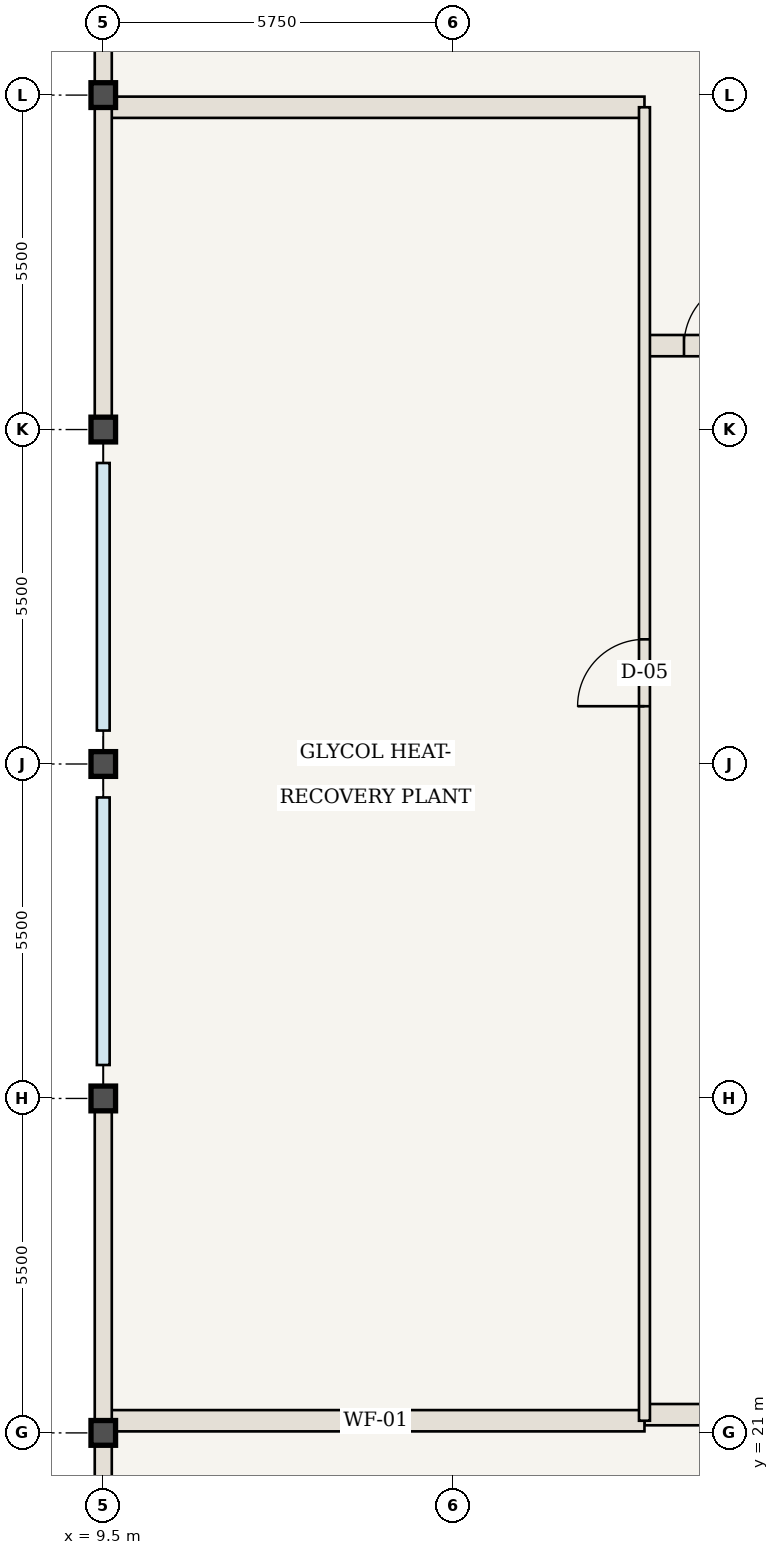
"""IFC4 building model, lengths in metres.
Left out: names, types, materials, properties, quantities, classifications, styles, units other than length and angle.
Written with IfcOpenShell. Run it as: python <this file> out.ifc"""

import sys

from ifc_helpers import new_model, si_unit, direction, frame, frame_2d, origin, origin_2d, place, context, subcontext, project, spatial, rectangle, i_section, extrude, element, fill, save


model = new_model("IFC4")
c1 = context("Model", 3, precision=1e-05, world=origin(), true_north=direction((0.0, 1.0)))
c2 = subcontext(c1, "Body", "Model", "MODEL_VIEW")
j1 = project(units=[si_unit("LENGTHUNIT", "METRE"), si_unit("PLANEANGLEUNIT", "RADIAN")], contexts=[c1])
p1 = place(None, origin())
s1 = spatial("IfcSite", under=j1, at=p1, CompositionType="ELEMENT")
p2 = place(p1, origin())
s2 = spatial("IfcBuilding", under=s1, at=p2, CompositionType="ELEMENT")
p3 = place(p2, frame((0.0, 0.0, 317.8)))
s3 = spatial("IfcBuildingStorey", under=s2, at=p3, CompositionType="ELEMENT", Elevation=317.8)
for number, where, z_axis, x_axis in (
    (1, (9.5, 21.0, 0.0), (0.0, 0.0, 1.0), (1.0, 0.0, 0.0)),
    (2, (9.5, 26.5, 0.0), (0.0, 0.0, 1.0), (1.0, 0.0, 0.0)),
    (3, (9.5, 32.0, 0.0), (0.0, 0.0, 1.0), (1.0, 0.0, 0.0)),
    (4, (9.5, 37.5, 0.0), (0.0, 0.0, 1.0), (1.0, 0.0, 0.0)),
    (5, (9.5, 43.0, 0.0), (0.0, 0.0, 1.0), (1.0, 0.0, 0.0)),
):
    element("IfcColumn", number, at=place(p3, frame(where, z_axis=z_axis, x_axis=x_axis)), inside=s3, PredefinedType="COLUMN", context=c2, shape_type="SweptSolid", body=[
        extrude(i_section(OverallWidth=0.404, OverallDepth=0.407, WebThickness=0.027, FlangeThickness=0.044, at=origin_2d()), origin(), (0.0, 0.0, 1.0), 4.55),
    ])
p4 = place(p3, frame((18.4, 21.3, 0.0), z_axis=(0.0, 0.0, 1.0), x_axis=(1.0, 0.0, 0.0)))
e6 = element("IfcWall", 6, at=p4, inside=s3, PredefinedType="STANDARD", context=c2, shape_type="SweptSolid", body=[
    extrude(rectangle(XDim=2.55, YDim=0.35, at=frame_2d((1.275, 0.0))), origin(), (0.0, 0.0, 1.0), 4.29),
])
p5 = place(p3, frame((18.4, 38.88, 0.0), z_axis=(0.0, 0.0, 1.0), x_axis=(1.0, 0.0, 0.0)))
e7 = element("IfcWall", 7, at=p5, inside=s3, PredefinedType="STANDARD", context=c2, shape_type="SweptSolid", body=[
    extrude(rectangle(XDim=2.55, YDim=0.35, at=frame_2d((1.275, 0.0))), origin(), (0.0, 0.0, 1.0), 4.29),
])
p6 = place(p5, frame((0.65, 0.0, 0.0)))
e8 = element("IfcOpeningElement", 8, at=p6, cuts=e7, PredefinedType="OPENING", context=c2, shape_type="SweptSolid", body=[
    extrude(rectangle(XDim=1.1, YDim=2.15, at=frame_2d((0.55, 1.075))), frame((0.0, 0.185, 0.0), z_axis=(0.0, -1.0, 0.0), x_axis=(1.0, 0.0, 0.0)), (0.0, 0.0, 1.0), 0.37),
])
for number, where, z_axis, x_axis in (
    (9, (9.56, 21.2, 0.0), (0.0, 0.0, 1.0), (1.0, 0.0, 0.0)),
    (10, (9.56, 42.8, 0.0), (0.0, 0.0, 1.0), (1.0, 0.0, 0.0)),
):
    element("IfcWall", number, at=place(p3, frame(where, z_axis=z_axis, x_axis=x_axis)), inside=s3, PredefinedType="STANDARD", context=c2, shape_type="SweptSolid", body=[
        extrude(rectangle(XDim=8.84, YDim=0.35, at=frame_2d((4.42, 0.0))), origin(), (0.0, 0.0, 1.0), 4.29),
    ])
p7 = place(p3, frame((18.4, 21.2, 0.0), z_axis=(0.0, 0.0, 1.0), x_axis=(0.0, 1.0, 0.0)))
e11 = element("IfcWall", 11, at=p7, inside=s3, PredefinedType="STANDARD", context=c2, shape_type="SweptSolid", body=[
    extrude(rectangle(XDim=21.6, YDim=0.18, at=frame_2d((10.8, 0.0))), origin(), (0.0, 0.0, 1.0), 4.29),
])
p8 = place(p7, frame((11.75, 0.0, 0.0)))
e12 = element("IfcOpeningElement", 12, at=p8, cuts=e11, PredefinedType="OPENING", context=c2, shape_type="SweptSolid", body=[
    extrude(rectangle(XDim=1.1, YDim=2.15, at=frame_2d((0.55, 1.075))), frame((0.0, 0.1, 0.0), z_axis=(0.0, -1.0, 0.0), x_axis=(1.0, 0.0, 0.0)), (0.0, 0.0, 1.0), 0.2),
])
for number, where, z_axis, x_axis in (
    (13, (9.5, 15.5, 0.0), (0.0, 0.0, 1.0), (0.0, 1.0, 0.0)),
    (14, (9.5, 21.0, 0.0), (0.0, 0.0, 1.0), (0.0, 1.0, 0.0)),
    (15, (9.5, 37.5, 0.0), (0.0, 0.0, 1.0), (0.0, 1.0, 0.0)),
    (16, (9.5, 43.0, 0.0), (0.0, 0.0, 1.0), (0.0, 1.0, 0.0)),
):
    element("IfcWall", number, at=place(p3, frame(where, z_axis=z_axis, x_axis=x_axis)), inside=s3, PredefinedType="USERDEFINED", context=c2, shape_type="SweptSolid", body=[
        extrude(rectangle(XDim=5.5, YDim=0.28, at=frame_2d((2.75, 0.0))), origin(), (0.0, 0.0, 1.0), 3.57),
    ])
p9 = place(p6, origin())
e17 = element("IfcDoor", 17, at=p9, inside=s3, OperationType="SINGLE_SWING_RIGHT", PredefinedType="DOOR", context=c2, shape_type="SweptSolid", body=[
    extrude(rectangle(XDim=1.1, YDim=2.15, at=frame_2d((0.55, 1.075))), frame((0.0, 0.025, 0.0), z_axis=(0.0, -1.0, 0.0), x_axis=(1.0, 0.0, 0.0)), (0.0, 0.0, 1.0), 0.05),
])
fill(e8, e17)
p10 = place(p8, origin())
e18 = element("IfcDoor", 18, at=p10, inside=s3, OperationType="SINGLE_SWING_LEFT", PredefinedType="DOOR", context=c2, shape_type="SweptSolid", body=[
    extrude(rectangle(XDim=1.1, YDim=2.15, at=frame_2d((0.55, 1.075))), frame((0.0, 0.025, 0.0), z_axis=(0.0, -1.0, 0.0), x_axis=(1.0, 0.0, 0.0)), (0.0, 0.0, 1.0), 0.05),
])
fill(e12, e18)
save(model, sys.argv[1])
